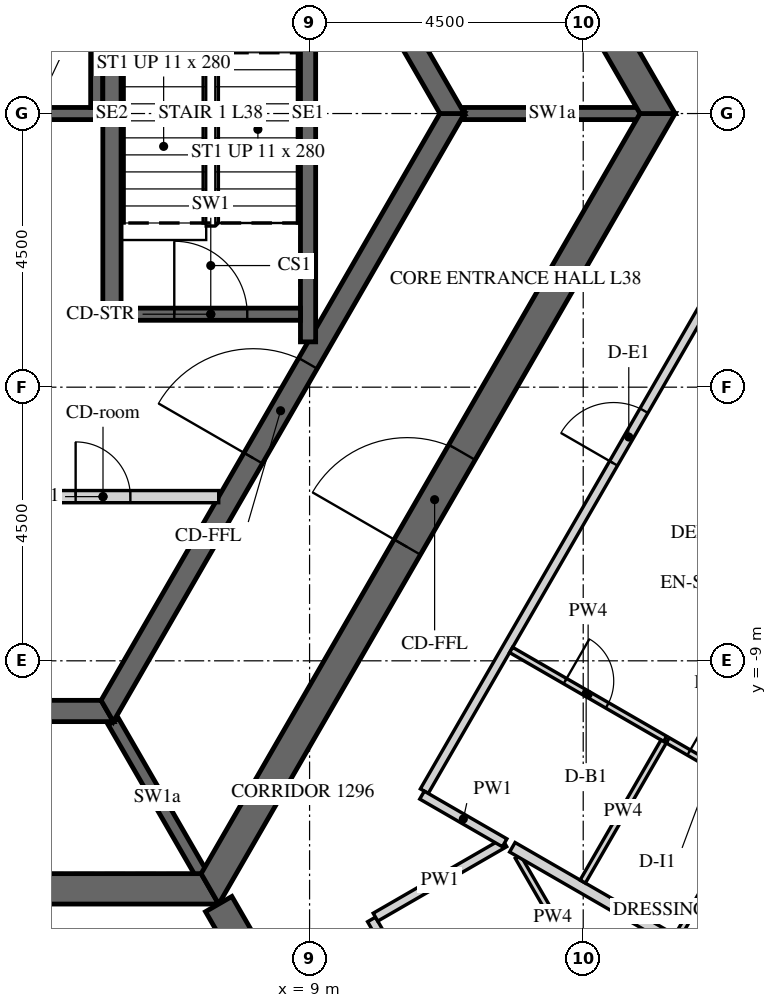
"""IFC4 building model, lengths in metres.
Left out: names, types, materials, properties, quantities, classifications, styles, units other than length and angle.
Written with IfcOpenShell. Run it as: python <this file> out.ifc"""

import sys

from ifc_helpers import new_model, si_unit, direction, frame, frame_2d, origin, place, context, subcontext, project, spatial, polyline, rectangle, outline, extrude, element, fill, save


model = new_model("IFC4")
c1 = context("Model", 3, precision=1e-05, world=origin(), true_north=direction((0.0, 1.0)))
c2 = subcontext(c1, "Body", "Model", "MODEL_VIEW")
j1 = project(units=[si_unit("LENGTHUNIT", "METRE"), si_unit("PLANEANGLEUNIT", "RADIAN")], contexts=[c1])
p1 = place(None, origin())
s1 = spatial("IfcSite", under=j1, at=p1, CompositionType="ELEMENT")
p2 = place(p1, origin())
s2 = spatial("IfcBuilding", under=s1, at=p2, CompositionType="ELEMENT")
p3 = place(p2, frame((0.0, 0.0, 164.4)))
s3 = spatial("IfcBuildingStorey", under=s2, at=p3, CompositionType="ELEMENT", Elevation=164.4)
p4 = place(p3, frame((-7.361, -12.75, -0.15), z_axis=(0.0, 0.0, 1.0), x_axis=(1.0, 0.0, 0.0)))
e1 = element("IfcWall", 1, at=p4, inside=s3, PredefinedType="SHEAR", context=c2, shape_type="SweptSolid", body=[
    extrude(outline(polyline([(-0.144, -0.25), (14.866, -0.25), (14.578, 0.25), (0.144, 0.25), (-0.144, -0.25)])), origin(), (0.0, 0.0, 1.0), 3.9),
])
p5 = place(p4, frame((6.761, 0.0, 0.15)))
e2 = element("IfcOpeningElement", 2, at=p5, cuts=e1, PredefinedType="OPENING", context=c2, shape_type="SweptSolid", body=[
    extrude(rectangle(XDim=1.2, YDim=2.4, at=frame_2d((0.6, 1.2))), frame((0.0, 0.26, 0.0), z_axis=(0.0, -1.0, 0.0), x_axis=(1.0, 0.0, 0.0)), (0.0, 0.0, 1.0), 0.52),
])
p6 = place(p3, frame((7.361, -12.75, -0.15), z_axis=(0.0, 0.0, 1.0), x_axis=(0.50000571537, 0.866022103989, 0.0)))
e3 = element("IfcWall", 3, at=p6, inside=s3, PredefinedType="SHEAR", context=c2, shape_type="SweptSolid", body=[
    extrude(outline(polyline([(-0.144, -0.25), (14.867, -0.25), (14.578, 0.25), (0.144, 0.25), (-0.144, -0.25)])), origin(), (0.0, 0.0, 1.0), 3.9),
])
p7 = place(p6, frame((6.49, 0.0, 0.15)))
e4 = element("IfcOpeningElement", 4, at=p7, cuts=e3, PredefinedType="OPENING", context=c2, shape_type="SweptSolid", body=[
    extrude(rectangle(XDim=1.8, YDim=2.4, at=frame_2d((0.9, 1.2))), frame((0.0, 0.26, 0.0), z_axis=(0.0, -1.0, 0.0), x_axis=(1.0, 0.0, 0.0)), (0.0, 0.0, 1.0), 0.52),
])
p8 = place(p3, frame((14.722, 0.0, -0.15), z_axis=(0.0, 0.0, 1.0), x_axis=(-0.50000571537, 0.866022103989, 0.0)))
e5 = element("IfcWall", 5, at=p8, inside=s3, PredefinedType="SHEAR", context=c2, shape_type="SweptSolid", body=[
    extrude(outline(polyline([(-0.144, -0.25), (14.867, -0.25), (14.578, 0.25), (0.144, 0.25), (-0.144, -0.25)])), origin(), (0.0, 0.0, 1.0), 3.9),
])
p9 = place(p8, frame((6.432, 0.0, 0.15)))
e6 = element("IfcOpeningElement", 6, at=p9, cuts=e5, PredefinedType="OPENING", context=c2, shape_type="SweptSolid", body=[
    extrude(rectangle(XDim=1.8, YDim=2.4, at=frame_2d((0.9, 1.2))), frame((0.0, 0.26, 0.0), z_axis=(0.0, -1.0, 0.0), x_axis=(1.0, 0.0, 0.0)), (0.0, 0.0, 1.0), 0.52),
])
p10 = place(p3, frame((7.506, -13.0, -0.15), z_axis=(0.0, 0.0, 1.0), x_axis=(0.499988271576, -0.866032175087, 0.0)))
e7 = element("IfcWall", 7, at=p10, inside=s3, PredefinedType="SHEAR", context=c2, shape_type="SweptSolid", body=[
    extrude(rectangle(XDim=15.424, YDim=0.5, at=frame_2d((7.712, 0.0))), origin(), (0.0, 0.0, 1.0), 3.9),
])
p11 = place(p10, frame((6.812, 0.0, 0.15)))
e8 = element("IfcOpeningElement", 8, at=p11, cuts=e7, PredefinedType="OPENING", context=c2, shape_type="SweptSolid", body=[
    extrude(rectangle(XDim=1.8, YDim=2.4, at=frame_2d((0.9, 1.2))), frame((0.0, 0.26, 0.0), z_axis=(0.0, -1.0, 0.0), x_axis=(1.0, 0.0, 0.0)), (0.0, 0.0, 1.0), 0.52),
])
p12 = place(p3, frame((-5.673, -9.825, -0.15), z_axis=(0.0, 0.0, 1.0), x_axis=(1.0, 0.0, 0.0)))
e9 = element("IfcWall", 9, at=p12, inside=s3, PredefinedType="SHEAR", context=c2, shape_type="SweptSolid", body=[
    extrude(outline(polyline([(-0.101, -0.175), (11.446, -0.175), (11.244, 0.175), (0.101, 0.175), (-0.101, -0.175)])), origin(), (0.0, 0.0, 1.0), 3.9),
])
p13 = place(p3, frame((5.673, -9.825, -0.15), z_axis=(0.0, 0.0, 1.0), x_axis=(0.499995046907, 0.866028263435, 0.0)))
e10 = element("IfcWall", 10, at=p13, inside=s3, PredefinedType="SHEAR", context=c2, shape_type="SweptSolid", body=[
    extrude(outline(polyline([(-0.101, -0.175), (11.446, -0.175), (11.244, 0.175), (0.101, 0.175), (-0.101, -0.175)])), origin(), (0.0, 0.0, 1.0), 3.9),
])
p14 = place(p13, frame((4.801, 0.0, 0.15)))
e11 = element("IfcOpeningElement", 11, at=p14, cuts=e10, PredefinedType="OPENING", context=c2, shape_type="SweptSolid", body=[
    extrude(rectangle(XDim=1.8, YDim=2.4, at=frame_2d((0.9, 1.2))), frame((0.0, 0.185, 0.0), z_axis=(0.0, -1.0, 0.0), x_axis=(1.0, 0.0, 0.0)), (0.0, 0.0, 1.0), 0.37),
])
p15 = place(p3, frame((11.345, 0.0, -0.15), z_axis=(0.0, 0.0, 1.0), x_axis=(-0.499995046907, 0.866028263435, 0.0)))
e12 = element("IfcWall", 12, at=p15, inside=s3, PredefinedType="SHEAR", context=c2, shape_type="SweptSolid", body=[
    extrude(outline(polyline([(-0.101, -0.175), (11.446, -0.175), (11.244, 0.175), (0.101, 0.175), (-0.101, -0.175)])), origin(), (0.0, 0.0, 1.0), 3.9),
])
p16 = place(p15, frame((4.744, 0.0, 0.15)))
e13 = element("IfcOpeningElement", 13, at=p16, cuts=e12, PredefinedType="OPENING", context=c2, shape_type="SweptSolid", body=[
    extrude(rectangle(XDim=1.8, YDim=2.4, at=frame_2d((0.9, 1.2))), frame((0.0, 0.185, 0.0), z_axis=(0.0, -1.0, 0.0), x_axis=(1.0, 0.0, 0.0)), (0.0, 0.0, 1.0), 0.37),
])
p17 = place(p3, frame((-5.6, 0.0, -0.25), z_axis=(0.0, 0.0, 1.0), x_axis=(1.0, 0.0, 0.0)))
e14 = element("IfcWall", 14, at=p17, inside=s3, PredefinedType="SHEAR", context=c2, shape_type="SweptSolid", body=[
    extrude(rectangle(XDim=11.2, YDim=0.2, at=frame_2d((5.6, 0.0))), origin(), (0.0, 0.0, 1.0), 3.9),
])
p18 = place(p3, frame((5.5, 0.1, -0.25), z_axis=(0.0, 0.0, 1.0), x_axis=(0.0, 1.0, 0.0)))
e15 = element("IfcWall", 15, at=p18, inside=s3, PredefinedType="SHEAR", context=c2, shape_type="SweptSolid", body=[
    extrude(rectangle(XDim=3.1, YDim=0.2, at=frame_2d((1.55, 0.0))), origin(), (0.0, 0.0, 1.0), 3.9),
])
p19 = place(p3, frame((3.7, -6.3, 0.0), z_axis=(0.0, 0.0, 1.0), x_axis=(1.0, 0.0, 0.0)))
e16 = element("IfcWall", 16, at=p19, inside=s3, PredefinedType="PARTITIONING", context=c2, shape_type="SweptSolid", body=[
    extrude(rectangle(XDim=3.806, YDim=0.2, at=frame_2d((1.903, 0.0))), origin(), (0.0, 0.0, 1.0), 3.65),
])
p20 = place(p19, frame((1.453, 0.0, 0.0)))
e17 = element("IfcOpeningElement", 17, at=p20, cuts=e16, PredefinedType="OPENING", context=c2, shape_type="SweptSolid", body=[
    extrude(rectangle(XDim=0.9, YDim=2.1, at=frame_2d((0.45, 1.05))), frame((0.0, 0.11, 0.0), z_axis=(0.0, -1.0, 0.0), x_axis=(1.0, 0.0, 0.0)), (0.0, 0.0, 1.0), 0.22),
])
for number, where, z_axis, x_axis in (
    (18, (11.547, 0.0, -0.15), (0.0, 0.0, 1.0), (1.0, 0.0, 0.0)),
    (19, (5.773, -10.0, -0.15), (0.0, 0.0, 1.0), (0.5, -0.866, 0.0)),
):
    element("IfcWall", number, at=place(p3, frame(where, z_axis=z_axis, x_axis=x_axis)), inside=s3, PredefinedType="SHEAR", context=c2, shape_type="SweptSolid", body=[
        extrude(rectangle(XDim=2.887, YDim=0.2, at=frame_2d((1.443, 0.0))), origin(), (0.0, 0.0, 1.0), 3.9),
    ])
p21 = place(p3, frame((5.75, -3.4, -0.25), z_axis=(0.0, 0.0, 1.0), x_axis=(0.0, 1.0, 0.0)))
e20 = element("IfcWall", 20, at=p21, inside=s3, PredefinedType="SHEAR", context=c2, shape_type="SweptSolid", body=[
    extrude(rectangle(XDim=6.8, YDim=0.3, at=frame_2d((3.4, 0.0))), origin(), (0.0, 0.0, 1.0), 3.9),
])
p22 = place(p3, frame((8.975, -3.755, -0.25), z_axis=(0.0, 0.0, 1.0), x_axis=(0.0, 1.0, 0.0)))
e21 = element("IfcWall", 21, at=p22, inside=s3, PredefinedType="SHEAR", context=c2, shape_type="SweptSolid", body=[
    extrude(rectangle(XDim=7.51, YDim=0.25, at=frame_2d((3.755, 0.0))), origin(), (0.0, 0.0, 1.0), 3.9),
])
p23 = place(p3, frame((5.9, -3.3, -0.25), z_axis=(0.0, 0.0, 1.0), x_axis=(1.0, 0.0, 0.0)))
e22 = element("IfcWall", 22, at=p23, inside=s3, PredefinedType="SHEAR", context=c2, shape_type="SweptSolid", body=[
    extrude(rectangle(XDim=2.95, YDim=0.2, at=frame_2d((1.475, 0.0))), origin(), (0.0, 0.0, 1.0), 3.9),
])
p24 = place(p23, frame((0.875, 0.0, 0.25)))
e23 = element("IfcOpeningElement", 23, at=p24, cuts=e22, PredefinedType="OPENING", context=c2, shape_type="SweptSolid", body=[
    extrude(rectangle(XDim=1.2, YDim=2.4, at=frame_2d((0.6, 1.2))), frame((0.0, 0.11, 0.0), z_axis=(0.0, -1.0, 0.0), x_axis=(1.0, 0.0, 0.0)), (0.0, 0.0, 1.0), 0.22),
])
p25 = place(p3, frame((13.699, -19.628, 0.0), z_axis=(0.0, 0.0, 1.0), x_axis=(-0.499995202058, 0.86602817386, 0.0)))
e24 = element("IfcWall", 24, at=p25, inside=s3, PredefinedType="PARTITIONING", context=c2, shape_type="SweptSolid", body=[
    extrude(rectangle(XDim=7.361, YDim=0.15, at=frame_2d((3.68, 0.0))), origin(), (0.0, 0.0, 1.0), 2.988),
])
p26 = place(p25, frame((2.018, 0.0, 0.0)))
e25 = element("IfcOpeningElement", 25, at=p26, cuts=e24, PredefinedType="OPENING", context=c2, shape_type="SweptSolid", body=[
    extrude(rectangle(XDim=1.0, YDim=2.1, at=frame_2d((0.5, 1.05))), frame((0.0, 0.085, 0.0), z_axis=(0.0, -1.0, 0.0), x_axis=(1.0, 0.0, 0.0)), (0.0, 0.0, 1.0), 0.17),
])
p27 = place(p3, frame((10.084, -13.216, 0.0), z_axis=(0.0, 0.0, 1.0), x_axis=(0.866026229868, 0.499998569178, 0.0)))
e26 = element("IfcWall", 26, at=p27, inside=s3, PredefinedType="PARTITIONING", context=c2, shape_type="SweptSolid", body=[
    extrude(rectangle(XDim=2.449, YDim=0.15, at=frame_2d((1.225, 0.0))), origin(), (0.0, 0.0, 1.0), 2.988),
])
p28 = place(p3, frame((10.887, -11.144, 0.0), z_axis=(0.0, 0.0, 1.0), x_axis=(0.500006037985, 0.866021917724, 0.0)))
e27 = element("IfcWall", 27, at=p28, inside=s3, PredefinedType="PARTITIONING", context=c2, shape_type="SweptSolid", body=[
    extrude(rectangle(XDim=12.867, YDim=0.15, at=frame_2d((6.434, 0.0))), origin(), (0.0, 0.0, 1.0), 2.988),
])
p29 = place(p28, frame((6.225, 0.0, 0.0)))
e28 = element("IfcOpeningElement", 28, at=p29, cuts=e27, PredefinedType="OPENING", context=c2, shape_type="SweptSolid", body=[
    extrude(rectangle(XDim=1.0, YDim=2.1, at=frame_2d((0.5, 1.05))), frame((0.0, 0.085, 0.0), z_axis=(0.0, -1.0, 0.0), x_axis=(1.0, 0.0, 0.0)), (0.0, 0.0, 1.0), 0.17),
])
p30 = place(p28, frame((11.717, 0.0, 0.0)))
e29 = element("IfcOpeningElement", 29, at=p30, cuts=e27, PredefinedType="OPENING", context=c2, shape_type="SweptSolid", body=[
    extrude(rectangle(XDim=1.0, YDim=2.1, at=frame_2d((0.5, 1.05))), frame((0.0, 0.085, 0.0), z_axis=(0.0, -1.0, 0.0), x_axis=(1.0, 0.0, 0.0)), (0.0, 0.0, 1.0), 0.17),
])
p31 = place(p3, frame((12.208, -11.993, 0.0), z_axis=(0.0, 0.0, 1.0), x_axis=(-0.866011891242, 0.50002340368, 0.0)))
e30 = element("IfcWall", 30, at=p31, inside=s3, PredefinedType="PARTITIONING", context=c2, shape_type="SweptSolid", body=[
    extrude(rectangle(XDim=1.568, YDim=0.15, at=frame_2d((0.784, 0.0))), origin(), (0.0, 0.0, 1.0), 2.988),
])
p32 = place(p3, frame((17.277, 0.075, 0.0), z_axis=(0.0, 0.0, 1.0), x_axis=(-0.499988884089, 0.866031821464, 0.0)))
e31 = element("IfcWall", 31, at=p32, inside=s3, PredefinedType="PARTITIONING", context=c2, shape_type="SweptSolid", body=[
    extrude(rectangle(XDim=14.78, YDim=0.15, at=frame_2d((7.39, 0.0))), origin(), (0.0, 0.0, 1.0), 2.988),
])
p33 = place(p32, frame((4.393, 0.0, 0.0)))
e32 = element("IfcOpeningElement", 32, at=p33, cuts=e31, PredefinedType="OPENING", context=c2, shape_type="SweptSolid", body=[
    extrude(rectangle(XDim=1.0, YDim=2.1, at=frame_2d((0.5, 1.05))), frame((0.0, 0.085, 0.0), z_axis=(0.0, -1.0, 0.0), x_axis=(1.0, 0.0, 0.0)), (0.0, 0.0, 1.0), 0.17),
])
p34 = place(p32, frame((8.885, 0.0, 0.0)))
e33 = element("IfcOpeningElement", 33, at=p34, cuts=e31, PredefinedType="OPENING", context=c2, shape_type="SweptSolid", body=[
    extrude(rectangle(XDim=1.0, YDim=2.1, at=frame_2d((0.5, 1.05))), frame((0.0, 0.085, 0.0), z_axis=(0.0, -1.0, 0.0), x_axis=(1.0, 0.0, 0.0)), (0.0, 0.0, 1.0), 0.17),
])
p35 = place(p3, frame((12.426, -12.223, 0.0), z_axis=(0.0, 0.0, 1.0), x_axis=(0.499959451571, -0.866048813165, 0.0)))
e34 = element("IfcWall", 34, at=p35, inside=s3, PredefinedType="PARTITIONING", context=c2, shape_type="SweptSolid", body=[
    extrude(rectangle(XDim=2.289, YDim=0.1, at=frame_2d((1.145, 0.0))), origin(), (0.0, 0.0, 1.0), 2.988),
])
p36 = place(p3, frame((21.631, -17.433, 0.0), z_axis=(0.0, 0.0, 1.0), x_axis=(-0.866030310389, 0.499991501415, 0.0)))
e35 = element("IfcWall", 35, at=p36, inside=s3, PredefinedType="PARTITIONING", context=c2, shape_type="SweptSolid", body=[
    extrude(rectangle(XDim=10.735, YDim=0.18, at=frame_2d((5.368, 0.0))), origin(), (0.0, 0.0, 1.0), 2.988),
])
p37 = place(p3, frame((12.314, -8.821, 0.0), z_axis=(0.0, 0.0, 1.0), x_axis=(0.866046596414, -0.499963291492, 0.0)))
e36 = element("IfcWall", 36, at=p37, inside=s3, PredefinedType="PARTITIONING", context=c2, shape_type="SweptSolid", body=[
    extrude(rectangle(XDim=2.925, YDim=0.1, at=frame_2d((1.462, 0.0))), origin(), (0.0, 0.0, 1.0), 2.988),
])
p38 = place(p37, frame((1.025, 0.0, 0.0)))
e37 = element("IfcOpeningElement", 37, at=p38, cuts=e36, PredefinedType="OPENING", context=c2, shape_type="SweptSolid", body=[
    extrude(rectangle(XDim=0.8, YDim=2.1, at=frame_2d((0.4, 1.05))), frame((0.0, 0.06, 0.0), z_axis=(0.0, -1.0, 0.0), x_axis=(1.0, 0.0, 0.0)), (0.0, 0.0, 1.0), 0.12),
])
p39 = place(p3, frame((14.891, -10.309, 0.0), z_axis=(0.0, 0.0, 1.0), x_axis=(0.866036909293, -0.499980071345, 0.0)))
e38 = element("IfcWall", 38, at=p39, inside=s3, PredefinedType="PARTITIONING", context=c2, shape_type="SweptSolid", body=[
    extrude(rectangle(XDim=1.75, YDim=0.1, at=frame_2d((0.875, 0.0))), origin(), (0.0, 0.0, 1.0), 2.988),
])
p40 = place(p39, frame((0.4, 0.0, 0.0)))
e39 = element("IfcOpeningElement", 39, at=p40, cuts=e38, PredefinedType="OPENING", context=c2, shape_type="SweptSolid", body=[
    extrude(rectangle(XDim=0.9, YDim=2.1, at=frame_2d((0.45, 1.05))), frame((0.0, 0.06, 0.0), z_axis=(0.0, -1.0, 0.0), x_axis=(1.0, 0.0, 0.0)), (0.0, 0.0, 1.0), 0.12),
])
p41 = place(p3, frame((16.381, -11.227, 0.0), z_axis=(0.0, 0.0, 1.0), x_axis=(-0.500008456887, -0.866020521143, 0.0)))
e40 = element("IfcWall", 40, at=p41, inside=s3, PredefinedType="PARTITIONING", context=c2, shape_type="SweptSolid", body=[
    extrude(rectangle(XDim=2.66, YDim=0.1, at=frame_2d((1.33, 0.0))), origin(), (0.0, 0.0, 1.0), 2.988),
])
p42 = place(p3, frame((13.492, -12.63, 0.0), z_axis=(0.0, 0.0, 1.0), x_axis=(0.50004820116, 0.865997573043, 0.0)))
e41 = element("IfcWall", 41, at=p42, inside=s3, PredefinedType="PARTITIONING", context=c2, shape_type="SweptSolid", body=[
    extrude(rectangle(XDim=2.66, YDim=0.1, at=frame_2d((1.33, 0.0))), origin(), (0.0, 0.0, 1.0), 2.988),
])
p43 = place(p7, origin())
e42 = element("IfcDoor", 42, at=p43, inside=s3, OperationType="DOUBLE_DOOR_SINGLE_SWING", PredefinedType="DOOR", context=c2, shape_type="SweptSolid", body=[
    extrude(rectangle(XDim=1.8, YDim=2.4, at=frame_2d((0.9, 1.2))), frame((0.0, 0.025, 0.0), z_axis=(0.0, -1.0, 0.0), x_axis=(1.0, 0.0, 0.0)), (0.0, 0.0, 1.0), 0.05),
])
fill(e4, e42)
p44 = place(p14, origin())
e43 = element("IfcDoor", 43, at=p44, inside=s3, OperationType="DOUBLE_DOOR_SINGLE_SWING", PredefinedType="DOOR", context=c2, shape_type="SweptSolid", body=[
    extrude(rectangle(XDim=1.8, YDim=2.4, at=frame_2d((0.9, 1.2))), frame((0.0, 0.025, 0.0), z_axis=(0.0, -1.0, 0.0), x_axis=(1.0, 0.0, 0.0)), (0.0, 0.0, 1.0), 0.05),
])
fill(e11, e43)
p45 = place(p20, origin())
e44 = element("IfcDoor", 44, at=p45, inside=s3, OperationType="SINGLE_SWING_LEFT", PredefinedType="DOOR", context=c2, shape_type="SweptSolid", body=[
    extrude(rectangle(XDim=0.9, YDim=2.1, at=frame_2d((0.45, 1.05))), frame((0.0, 0.025, 0.0), z_axis=(0.0, -1.0, 0.0), x_axis=(1.0, 0.0, 0.0)), (0.0, 0.0, 1.0), 0.05),
])
fill(e17, e44)
p46 = place(p24, origin())
e45 = element("IfcDoor", 45, at=p46, inside=s3, OperationType="SINGLE_SWING_LEFT", PredefinedType="DOOR", context=c2, shape_type="SweptSolid", body=[
    extrude(rectangle(XDim=1.2, YDim=2.4, at=frame_2d((0.6, 1.2))), frame((0.0, 0.025, 0.0), z_axis=(0.0, -1.0, 0.0), x_axis=(1.0, 0.0, 0.0)), (0.0, 0.0, 1.0), 0.05),
])
fill(e23, e45)
p47 = place(p29, origin())
e46 = element("IfcDoor", 46, at=p47, inside=s3, OperationType="SINGLE_SWING_LEFT", PredefinedType="DOOR", context=c2, shape_type="SweptSolid", body=[
    extrude(rectangle(XDim=1.0, YDim=2.1, at=frame_2d((0.5, 1.05))), frame((0.0, 0.025, 0.0), z_axis=(0.0, -1.0, 0.0), x_axis=(1.0, 0.0, 0.0)), (0.0, 0.0, 1.0), 0.05),
])
fill(e28, e46)
p48 = place(p38, origin())
e47 = element("IfcDoor", 47, at=p48, inside=s3, OperationType="SINGLE_SWING_RIGHT", PredefinedType="DOOR", context=c2, shape_type="SweptSolid", body=[
    extrude(rectangle(XDim=0.8, YDim=2.1, at=frame_2d((0.4, 1.05))), frame((0.0, 0.025, 0.0), z_axis=(0.0, -1.0, 0.0), x_axis=(1.0, 0.0, 0.0)), (0.0, 0.0, 1.0), 0.05),
])
fill(e37, e47)
p49 = place(p40, origin())
e48 = element("IfcDoor", 48, at=p49, inside=s3, OperationType="SINGLE_SWING_RIGHT", PredefinedType="DOOR", context=c2, shape_type="SweptSolid", body=[
    extrude(rectangle(XDim=0.9, YDim=2.1, at=frame_2d((0.45, 1.05))), frame((0.0, 0.025, 0.0), z_axis=(0.0, -1.0, 0.0), x_axis=(1.0, 0.0, 0.0)), (0.0, 0.0, 1.0), 0.05),
])
fill(e39, e48)
save(model, sys.argv[1])
